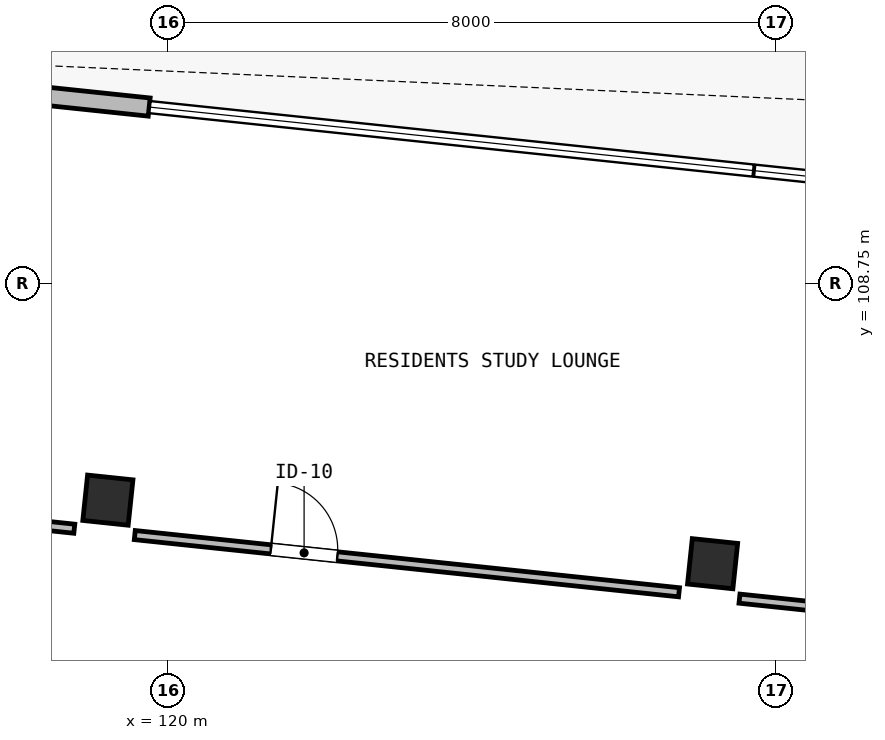
"""IFC4 building model, lengths in metres.
Left out: names, types, materials, properties, quantities, classifications, styles, units other than length and angle.
Written with IfcOpenShell. Run it as: python <this file> out.ifc"""

import sys

from ifc_helpers import new_model, si_unit, direction, frame, frame_2d, origin, origin_2d, place, context, subcontext, project, spatial, rectangle, extrude, element, fill, save


model = new_model("IFC4")
c1 = context("Model", 3, precision=1e-05, world=origin(), true_north=direction((0.0, 1.0)))
c2 = subcontext(c1, "Body", "Model", "MODEL_VIEW")
j1 = project(units=[si_unit("LENGTHUNIT", "METRE"), si_unit("PLANEANGLEUNIT", "RADIAN")], contexts=[c1])
p1 = place(None, origin())
s1 = spatial("IfcSite", under=j1, at=p1, CompositionType="ELEMENT")
p2 = place(p1, origin())
s2 = spatial("IfcBuilding", under=s1, at=p2, CompositionType="ELEMENT")
p3 = place(p2, origin())
s3 = spatial("IfcBuildingStorey", under=s2, at=p3, CompositionType="ELEMENT", Elevation=0.0)
for number, where, z_axis, x_axis in (
    (1, (119.21, 105.898, -0.35), (0.0, 0.0, 1.0), (0.995, -0.105, 0.0)),
    (2, (127.167, 105.062, -0.35), (0.0, 0.0, 1.0), (0.995, -0.105, 0.0)),
):
    element("IfcColumn", number, at=place(p3, frame(where, z_axis=z_axis, x_axis=x_axis)), inside=s3, PredefinedType="COLUMN", context=c2, shape_type="SweptSolid", body=[
        extrude(rectangle(XDim=0.6, YDim=0.6, at=origin_2d()), origin(), (0.0, 0.0, 1.0), 4.85),
    ])
p4 = place(p3, frame((111.798, 111.906, 0.0), z_axis=(0.0, 0.0, 1.0), x_axis=(0.994522662826, -0.104521161134, 0.0)))
e3 = element("IfcWall", 3, at=p4, inside=s3, PredefinedType="SOLIDWALL", context=c2, shape_type="SweptSolid", body=[
    extrude(rectangle(XDim=8.0, YDim=0.24, at=frame_2d((4.0, 0.0))), origin(), (0.0, 0.0, 1.0), 3.35),
])
p5 = place(p3, frame((111.608, 106.275, 0.0), z_axis=(0.0, 0.0, 1.0), x_axis=(0.994524387998, -0.10450474476, 0.0)))
e4 = element("IfcWall", 4, at=p5, inside=s3, PredefinedType="PARTITIONING", context=c2, shape_type="SweptSolid", body=[
    extrude(rectangle(XDim=7.2, YDim=0.12, at=frame_2d((3.6, 0.0))), origin(), (0.0, 0.0, 1.0), 4.22),
])
p6 = place(p5, frame((1.8, 0.0, 0.0)))
e5 = element("IfcOpeningElement", 5, at=p6, cuts=e4, PredefinedType="OPENING", context=c2, shape_type="SweptSolid", body=[
    extrude(rectangle(XDim=0.9, YDim=2.1, at=frame_2d((0.45, 1.05))), frame((0.0, 0.075, 0.0), z_axis=(0.0, -1.0, 0.0), x_axis=(1.0, 0.0, 0.0)), (0.0, 0.0, 1.0), 0.15),
])
p7 = place(p3, frame((119.564, 105.438, 0.0), z_axis=(0.0, 0.0, 1.0), x_axis=(0.994524387998, -0.10450474476, 0.0)))
e6 = element("IfcWall", 6, at=p7, inside=s3, PredefinedType="PARTITIONING", context=c2, shape_type="SweptSolid", body=[
    extrude(rectangle(XDim=7.2, YDim=0.12, at=frame_2d((3.6, 0.0))), origin(), (0.0, 0.0, 1.0), 4.22),
])
p8 = place(p7, frame((1.8, 0.0, 0.0)))
e7 = element("IfcOpeningElement", 7, at=p8, cuts=e6, PredefinedType="OPENING", context=c2, shape_type="SweptSolid", body=[
    extrude(rectangle(XDim=0.88, YDim=2.1, at=frame_2d((0.44, 1.05))), frame((0.0, 0.075, 0.0), z_axis=(0.0, -1.0, 0.0), x_axis=(1.0, 0.0, 0.0)), (0.0, 0.0, 1.0), 0.15),
])
p9 = place(p3, frame((127.521, 104.602, 0.0), z_axis=(0.0, 0.0, 1.0), x_axis=(0.994520863291, -0.104538282357, 0.0)))
e8 = element("IfcWall", 8, at=p9, inside=s3, PredefinedType="PARTITIONING", context=c2, shape_type="SweptSolid", body=[
    extrude(rectangle(XDim=7.2, YDim=0.12, at=frame_2d((3.6, 0.0))), origin(), (0.0, 0.0, 1.0), 4.22),
])
p10 = place(p9, frame((1.8, 0.0, 0.0)))
e9 = element("IfcOpeningElement", 9, at=p10, cuts=e8, PredefinedType="OPENING", context=c2, shape_type="SweptSolid", body=[
    extrude(rectangle(XDim=0.9, YDim=2.1, at=frame_2d((0.45, 1.05))), frame((0.0, 0.075, 0.0), z_axis=(0.0, -1.0, 0.0), x_axis=(1.0, 0.0, 0.0)), (0.0, 0.0, 1.0), 0.15),
])
p11 = place(p8, origin())
e10 = element("IfcDoor", 10, at=p11, inside=s3, OperationType="SINGLE_SWING_LEFT", PredefinedType="DOOR", context=c2, shape_type="SweptSolid", body=[
    extrude(rectangle(XDim=0.88, YDim=2.1, at=frame_2d((0.44, 1.05))), frame((0.0, 0.025, 0.0), z_axis=(0.0, -1.0, 0.0), x_axis=(1.0, 0.0, 0.0)), (0.0, 0.0, 1.0), 0.05),
])
fill(e7, e10)
save(model, sys.argv[1])
